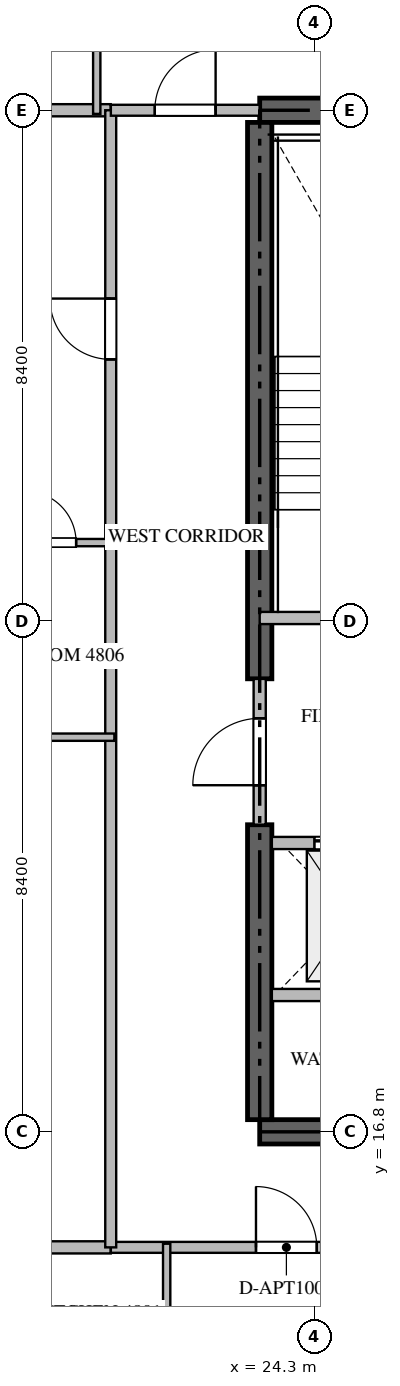
"""IFC4 building model, lengths in metres.
Left out: names, types, materials, properties, quantities, classifications, styles, units other than length and angle.
Written with IfcOpenShell. Run it as: python <this file> out.ifc"""

import sys

from ifc_helpers import new_model, si_unit, direction, frame, frame_2d, origin, place, context, subcontext, project, spatial, rectangle, extrude, source, transform, mapped, element, fill, save


model = new_model("IFC4")
c1 = context("Model", 3, precision=1e-05, world=origin(), true_north=direction((0.0, 1.0)))
c2 = subcontext(c1, "Body", "Model", "MODEL_VIEW")
j1 = project(units=[si_unit("LENGTHUNIT", "METRE"), si_unit("PLANEANGLEUNIT", "RADIAN")], contexts=[c1])
p1 = place(None, origin())
s1 = spatial("IfcSite", under=j1, at=p1, CompositionType="ELEMENT")
p2 = place(p1, origin())
s2 = spatial("IfcBuilding", under=s1, at=p2, CompositionType="ELEMENT")
p3 = place(p2, frame((0.0, 0.0, 191.4)))
s3 = spatial("IfcBuildingStorey", under=s2, at=p3, CompositionType="ELEMENT", Elevation=191.4)
for number, where, z_axis, x_axis in (
    (1, (23.4, 16.8, -0.26), (0.0, 0.0, 1.0), (1.0, 0.0, 0.0)),
    (2, (41.4, 33.6, -0.26), (0.0, 0.0, 1.0), (-1.0, 0.0, 0.0)),
):
    element("IfcWall", number, at=place(p3, frame(where, z_axis=z_axis, x_axis=x_axis)), inside=s3, PredefinedType="SHEAR", context=c2, shape_type="SweptSolid", body=[
        extrude(rectangle(XDim=18.0, YDim=0.4, at=frame_2d((9.0, 0.0))), origin(), (0.0, 0.0, 1.0), 3.748),
    ])
p4 = place(p3, frame((23.4, 17.0, -0.26), z_axis=(0.0, 0.0, 1.0), x_axis=(0.0, 1.0, 0.0)))
e3 = element("IfcWall", 3, at=p4, inside=s3, PredefinedType="SHEAR", context=c2, shape_type="SweptSolid", body=[
    extrude(rectangle(XDim=4.85, YDim=0.4, at=frame_2d((2.425, 0.0))), origin(), (0.0, 0.0, 1.0), 3.748),
])
p5 = place(p3, frame((23.4, 24.25, -0.26), z_axis=(0.0, 0.0, 1.0), x_axis=(0.0, 1.0, 0.0)))
e4 = element("IfcWall", 4, at=p5, inside=s3, PredefinedType="SHEAR", context=c2, shape_type="SweptSolid", body=[
    extrude(rectangle(XDim=9.15, YDim=0.4, at=frame_2d((4.575, 0.0))), origin(), (0.0, 0.0, 1.0), 3.748),
])
p6 = place(p3, frame((23.4, 25.25, 0.0), z_axis=(0.0, 0.0, 1.0), x_axis=(1.0, 0.0, 0.0)))
e5 = element("IfcWall", 5, at=p6, inside=s3, PredefinedType="STANDARD", context=c2, shape_type="SweptSolid", body=[
    extrude(rectangle(XDim=4.45, YDim=0.2, at=frame_2d((2.225, 0.0))), origin(), (0.0, 0.0, 1.0), 3.49),
])
p7 = place(p6, frame((1.65, 0.0, 0.0)))
e6 = element("IfcOpeningElement", 6, at=p7, cuts=e5, PredefinedType="OPENING", context=c2, shape_type="SweptSolid", body=[
    extrude(rectangle(XDim=1.1, YDim=2.15, at=frame_2d((0.55, 1.075))), frame((0.0, 0.11, 0.0), z_axis=(0.0, -1.0, 0.0), x_axis=(1.0, 0.0, 0.0)), (0.0, 0.0, 1.0), 0.22),
])
p8 = place(p3, frame((23.6, 21.55, 0.0), z_axis=(0.0, 0.0, 1.0), x_axis=(1.0, 0.0, 0.0)))
e7 = element("IfcWall", 7, at=p8, inside=s3, PredefinedType="STANDARD", context=c2, shape_type="SweptSolid", body=[
    extrude(rectangle(XDim=2.45, YDim=0.2, at=frame_2d((1.225, 0.0))), origin(), (0.0, 0.0, 1.0), 3.49),
])
p9 = place(p8, frame((0.7, 0.0, 0.0)))
e8 = element("IfcOpeningElement", 8, at=p9, cuts=e7, PredefinedType="OPENING", context=c2, shape_type="SweptSolid", body=[
    extrude(rectangle(XDim=1.2, YDim=2.2, at=frame_2d((0.6, 1.1))), frame((0.0, 0.11, 0.0), z_axis=(0.0, -1.0, 0.0), x_axis=(1.0, 0.0, 0.0)), (0.0, 0.0, 1.0), 0.22),
])
p10 = place(p3, frame((23.6, 19.05, 0.0), z_axis=(0.0, 0.0, 1.0), x_axis=(1.0, 0.0, 0.0)))
e9 = element("IfcWall", 9, at=p10, inside=s3, PredefinedType="STANDARD", context=c2, shape_type="SweptSolid", body=[
    extrude(rectangle(XDim=2.45, YDim=0.2, at=frame_2d((1.225, 0.0))), origin(), (0.0, 0.0, 1.0), 3.49),
])
p11 = place(p3, frame((23.4, 21.852, 0.0), z_axis=(0.0, 0.0, 1.0), x_axis=(0.0, 1.0, 0.0)))
e10 = element("IfcWall", 10, at=p11, inside=s3, PredefinedType="STANDARD", context=c2, shape_type="SweptSolid", body=[
    extrude(rectangle(XDim=2.396, YDim=0.2, at=frame_2d((1.198, 0.0))), origin(), (0.0, 0.0, 1.0), 3.49),
])
p12 = place(p11, frame((0.648, 0.0, 0.0)))
e11 = element("IfcOpeningElement", 11, at=p12, cuts=e10, PredefinedType="OPENING", context=c2, shape_type="SweptSolid", body=[
    extrude(rectangle(XDim=1.1, YDim=2.15, at=frame_2d((0.55, 1.075))), frame((0.0, 0.11, 0.0), z_axis=(0.0, -1.0, 0.0), x_axis=(1.0, 0.0, 0.0)), (0.0, 0.0, 1.0), 0.22),
])
for number, where, z_axis, x_axis in (
    (12, (7.882, 14.9, 0.0), (0.0, 0.0, 1.0), (1.0, 0.0, 0.0)),
    (13, (7.882, 33.6, 0.0), (0.0, 0.0, 1.0), (1.0, 0.0, 0.0)),
):
    element("IfcWall", number, at=place(p3, frame(where, z_axis=z_axis, x_axis=x_axis)), inside=s3, PredefinedType="PARTITIONING", context=c2, shape_type="SweptSolid", body=[
        extrude(rectangle(XDim=13.068, YDim=0.2, at=frame_2d((6.534, 0.0))), origin(), (0.0, 0.0, 1.0), 3.49),
    ])
p13 = place(p3, frame((20.952, 14.9, 0.0), z_axis=(0.0, 0.0, 1.0), x_axis=(1.0, 0.0, 0.0)))
e14 = element("IfcWall", 14, at=p13, inside=s3, PredefinedType="PARTITIONING", context=c2, shape_type="SweptSolid", body=[
    extrude(rectangle(XDim=22.896, YDim=0.18, at=frame_2d((11.448, 0.0))), origin(), (0.0, 0.0, 1.0), 3.49),
])
p14 = place(p13, frame((2.387, 0.0, 0.0)))
e15 = element("IfcOpeningElement", 15, at=p14, cuts=e14, PredefinedType="OPENING", context=c2, shape_type="SweptSolid", body=[
    extrude(rectangle(XDim=1.0, YDim=2.15, at=frame_2d((0.5, 1.075))), frame((0.0, 0.1, 0.0), z_axis=(0.0, -1.0, 0.0), x_axis=(1.0, 0.0, 0.0)), (0.0, 0.0, 1.0), 0.2),
])
p15 = place(p13, frame((14.867, 0.0, 0.0)))
e16 = element("IfcOpeningElement", 16, at=p15, cuts=e14, PredefinedType="OPENING", context=c2, shape_type="SweptSolid", body=[
    extrude(rectangle(XDim=1.0, YDim=2.15, at=frame_2d((0.5, 1.075))), frame((0.0, 0.1, 0.0), z_axis=(0.0, -1.0, 0.0), x_axis=(1.0, 0.0, 0.0)), (0.0, 0.0, 1.0), 0.2),
])
p16 = place(p13, frame((19.356, 0.0, 0.0)))
e17 = element("IfcOpeningElement", 17, at=p16, cuts=e14, PredefinedType="OPENING", context=c2, shape_type="SweptSolid", body=[
    extrude(rectangle(XDim=1.0, YDim=2.15, at=frame_2d((0.5, 1.075))), frame((0.0, 0.1, 0.0), z_axis=(0.0, -1.0, 0.0), x_axis=(1.0, 0.0, 0.0)), (0.0, 0.0, 1.0), 0.2),
])
p17 = place(p3, frame((20.95, 14.9, 0.0), z_axis=(0.0, 0.0, 1.0), x_axis=(0.0, 1.0, 0.0)))
e18 = element("IfcWall", 18, at=p17, inside=s3, PredefinedType="PARTITIONING", context=c2, shape_type="SweptSolid", body=[
    extrude(rectangle(XDim=18.7, YDim=0.18, at=frame_2d((9.35, 0.0))), origin(), (0.0, 0.0, 1.0), 3.49),
])
p18 = place(p17, frame((14.603, 0.0, 0.0)))
e19 = element("IfcOpeningElement", 19, at=p18, cuts=e18, PredefinedType="OPENING", context=c2, shape_type="SweptSolid", body=[
    extrude(rectangle(XDim=1.0, YDim=2.15, at=frame_2d((0.5, 1.075))), frame((0.0, 0.1, 0.0), z_axis=(0.0, -1.0, 0.0), x_axis=(1.0, 0.0, 0.0)), (0.0, 0.0, 1.0), 0.2),
])
p19 = place(p3, frame((20.952, 33.6, 0.0), z_axis=(0.0, 0.0, 1.0), x_axis=(1.0, 0.0, 0.0)))
e20 = element("IfcWall", 20, at=p19, inside=s3, PredefinedType="PARTITIONING", context=c2, shape_type="SweptSolid", body=[
    extrude(rectangle(XDim=2.446, YDim=0.18, at=frame_2d((1.223, 0.0))), origin(), (0.0, 0.0, 1.0), 3.49),
])
p20 = place(p19, frame((0.723, 0.0, 0.0)))
e21 = element("IfcOpeningElement", 21, at=p20, cuts=e20, PredefinedType="OPENING", context=c2, shape_type="SweptSolid", body=[
    extrude(rectangle(XDim=1.0, YDim=2.15, at=frame_2d((0.5, 1.075))), frame((0.0, 0.1, 0.0), z_axis=(0.0, -1.0, 0.0), x_axis=(1.0, 0.0, 0.0)), (0.0, 0.0, 1.0), 0.2),
])
for number, where, z_axis, x_axis in (
    (22, (21.87, 12.15, 0.0), (0.0, 0.0, 1.0), (0.0, 1.0, 0.0)),
    (23, (20.72, 36.35, 0.0), (0.0, 0.0, 1.0), (0.0, -1.0, 0.0)),
):
    element("IfcWall", number, at=place(p3, frame(where, z_axis=z_axis, x_axis=x_axis)), inside=s3, PredefinedType="PARTITIONING", context=c2, shape_type="SweptSolid", body=[
        extrude(rectangle(XDim=2.81, YDim=0.12, at=frame_2d((1.405, 0.0))), origin(), (0.0, 0.0, 1.0), 3.49),
    ])
p21 = place(p3, frame((18.9, 23.29, 0.0), z_axis=(0.0, 0.0, 1.0), x_axis=(1.0, 0.0, 0.0)))
e24 = element("IfcWall", 24, at=p21, inside=s3, PredefinedType="PARTITIONING", context=c2, shape_type="SweptSolid", body=[
    extrude(rectangle(XDim=2.11, YDim=0.12, at=frame_2d((1.055, 0.0))), origin(), (0.0, 0.0, 1.0), 3.49),
])
p22 = place(p3, frame((18.902, 26.49, 0.0), z_axis=(0.0, 0.0, 1.0), x_axis=(1.0, 0.0, 0.0)))
e25 = element("IfcWall", 25, at=p22, inside=s3, PredefinedType="PARTITIONING", context=c2, shape_type="SweptSolid", body=[
    extrude(rectangle(XDim=2.108, YDim=0.12, at=frame_2d((1.054, 0.0))), origin(), (0.0, 0.0, 1.0), 3.49),
])
p23 = place(p22, frame((0.629, 0.0, 0.0)))
e26 = element("IfcOpeningElement", 26, at=p23, cuts=e25, PredefinedType="OPENING", context=c2, shape_type="SweptSolid", body=[
    extrude(rectangle(XDim=0.85, YDim=2.1, at=frame_2d((0.425, 1.05))), frame((0.0, 0.07, 0.0), z_axis=(0.0, -1.0, 0.0), x_axis=(1.0, 0.0, 0.0)), (0.0, 0.0, 1.0), 0.14),
])
m1 = source(origin(), c2, "Body", "SweptSolid", [
    extrude(rectangle(XDim=1.2, YDim=2.2, at=frame_2d((0.6, 1.1))), frame((0.0, 0.025, 0.0), z_axis=(0.0, -1.0, 0.0), x_axis=(1.0, 0.0, 0.0)), (0.0, 0.0, 1.0), 0.05),
])
p24 = place(p9, origin())
e27 = element("IfcDoor", 27, at=p24, inside=s3, OperationType="DOUBLE_DOOR_SLIDING", PredefinedType="DOOR", context=c2, shape_type="MappedRepresentation", body=[
    mapped(m1, transform((0.0, 0.0, 0.0), scale=1.0)),
])
fill(e8, e27)
m2 = source(origin(), c2, "Body", "SweptSolid", [
    extrude(rectangle(XDim=1.1, YDim=2.15, at=frame_2d((0.55, 1.075))), frame((0.0, 0.025, 0.0), z_axis=(0.0, -1.0, 0.0), x_axis=(1.0, 0.0, 0.0)), (0.0, 0.0, 1.0), 0.05),
])
p25 = place(p12, origin())
e28 = element("IfcDoor", 28, at=p25, inside=s3, OperationType="SINGLE_SWING_LEFT", PredefinedType="DOOR", context=c2, shape_type="MappedRepresentation", body=[
    mapped(m2, transform((0.0, 0.0, 0.0), scale=1.0)),
])
fill(e11, e28)
m3 = source(origin(), c2, "Body", "SweptSolid", [
    extrude(rectangle(XDim=1.0, YDim=2.15, at=frame_2d((0.5, 1.075))), frame((0.0, 0.025, 0.0), z_axis=(0.0, -1.0, 0.0), x_axis=(1.0, 0.0, 0.0)), (0.0, 0.0, 1.0), 0.05),
])
p26 = place(p14, origin())
e29 = element("IfcDoor", 29, at=p26, inside=s3, OperationType="SINGLE_SWING_LEFT", PredefinedType="DOOR", context=c2, shape_type="MappedRepresentation", body=[
    mapped(m3, transform((0.0, 0.0, 0.0), scale=1.0)),
])
fill(e15, e29)
p27 = place(p18, origin())
e30 = element("IfcDoor", 30, at=p27, inside=s3, OperationType="SINGLE_SWING_RIGHT", PredefinedType="DOOR", context=c2, shape_type="MappedRepresentation", body=[
    mapped(m3, transform((0.0, 0.0, 0.0), scale=1.0)),
])
fill(e19, e30)
p28 = place(p20, origin())
e31 = element("IfcDoor", 31, at=p28, inside=s3, OperationType="SINGLE_SWING_RIGHT", PredefinedType="DOOR", context=c2, shape_type="MappedRepresentation", body=[
    mapped(m3, transform((0.0, 0.0, 0.0), scale=1.0)),
])
fill(e21, e31)
m4 = source(origin(), c2, "Body", "SweptSolid", [
    extrude(rectangle(XDim=0.85, YDim=2.1, at=frame_2d((0.425, 1.05))), frame((0.0, 0.025, 0.0), z_axis=(0.0, -1.0, 0.0), x_axis=(1.0, 0.0, 0.0)), (0.0, 0.0, 1.0), 0.05),
])
p29 = place(p23, origin())
e32 = element("IfcDoor", 32, at=p29, inside=s3, OperationType="SINGLE_SWING_LEFT", PredefinedType="DOOR", context=c2, shape_type="MappedRepresentation", body=[
    mapped(m4, transform((0.0, 0.0, 0.0), scale=1.0)),
])
fill(e26, e32)
save(model, sys.argv[1])
